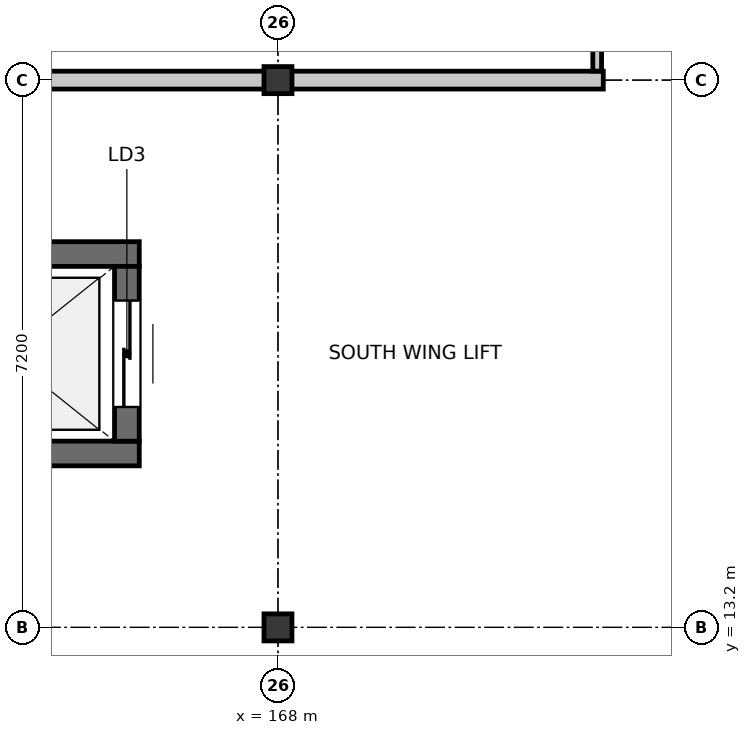
"""IFC4 building model, lengths in metres.
Left out: names, types, materials, properties, quantities, classifications, styles, units other than length and angle.
Written with IfcOpenShell. Run it as: python <this file> out.ifc"""

import sys

from ifc_helpers import new_model, si_unit, direction, frame, frame_2d, origin, origin_2d, place, context, subcontext, project, spatial, rectangle, i_section, extrude, element, fill, save


model = new_model("IFC4")
c1 = context("Model", 3, precision=1e-05, world=origin(), true_north=direction((0.0, 1.0)))
c2 = subcontext(c1, "Body", "Model", "MODEL_VIEW")
j1 = project(units=[si_unit("LENGTHUNIT", "METRE"), si_unit("PLANEANGLEUNIT", "RADIAN")], contexts=[c1])
p1 = place(None, origin())
s1 = spatial("IfcSite", under=j1, at=p1, CompositionType="ELEMENT")
p2 = place(p1, origin())
s2 = spatial("IfcBuilding", under=s1, at=p2, CompositionType="ELEMENT")
p3 = place(p2, frame((0.0, 0.0, 9.3)))
s3 = spatial("IfcBuildingStorey", under=s2, at=p3, CompositionType="ELEMENT", Elevation=9.3)
for number, where, z_axis, x_axis in (
    (1, (168.0, 13.2, 0.0), (0.0, 0.0, 1.0), (1.0, 0.0, 0.0)),
    (2, (168.0, 20.4, 0.0), (0.0, 0.0, 1.0), (1.0, 0.0, 0.0)),
):
    element("IfcColumn", number, at=place(p3, frame(where, z_axis=z_axis, x_axis=x_axis)), inside=s3, PredefinedType="COLUMN", context=c2, shape_type="SweptSolid", body=[
        extrude(i_section(OverallWidth=0.368, OverallDepth=0.356, WebThickness=0.011, FlangeThickness=0.018, FilletRadius=0.015, at=origin_2d()), origin(), (0.0, 0.0, 1.0), 3.9),
    ])
for number, where, z_axis, x_axis in (
    (3, (166.175, 15.488, 0.0), (0.0, 0.0, 1.0), (-1.0, 0.0, 0.0)),
    (4, (162.625, 18.112, 0.0), (0.0, 0.0, 1.0), (1.0, 0.0, 0.0)),
):
    element("IfcWall", number, at=place(p3, frame(where, z_axis=z_axis, x_axis=x_axis)), inside=s3, PredefinedType="SHEAR", context=c2, shape_type="SweptSolid", body=[
        extrude(rectangle(XDim=3.55, YDim=0.325, at=frame_2d((1.775, 0.0))), origin(), (0.0, 0.0, 1.0), 3.6),
    ])
p4 = place(p3, frame((166.012, 17.95, 0.0), z_axis=(0.0, 0.0, 1.0), x_axis=(0.0, -1.0, 0.0)))
e5 = element("IfcWall", 5, at=p4, inside=s3, PredefinedType="SHEAR", context=c2, shape_type="SweptSolid", body=[
    extrude(rectangle(XDim=2.3, YDim=0.325, at=frame_2d((1.15, 0.0))), origin(), (0.0, 0.0, 1.0), 3.6),
])
p5 = place(p4, frame((0.45, 0.0, 0.0)))
e6 = element("IfcOpeningElement", 6, at=p5, cuts=e5, PredefinedType="OPENING", context=c2, shape_type="SweptSolid", body=[
    extrude(rectangle(XDim=1.4, YDim=2.3, at=frame_2d((0.7, 1.15))), frame((0.0, 0.172, 0.0), z_axis=(0.0, -1.0, 0.0), x_axis=(1.0, 0.0, 0.0)), (0.0, 0.0, 1.0), 0.345),
])
p6 = place(p3, frame((172.28, 20.4, 0.0), z_axis=(0.0, 0.0, 1.0), x_axis=(-1.0, 0.0, 0.0)))
e7 = element("IfcWall", 7, at=p6, inside=s3, PredefinedType="PARTITIONING", context=c2, shape_type="SweptSolid", body=[
    extrude(rectangle(XDim=18.548, YDim=0.235, at=frame_2d((9.274, 0.0))), origin(), (0.0, 0.0, 1.0), 2.823),
])
p7 = place(p3, frame((172.2, 59.873, 0.0), z_axis=(0.0, 0.0, 1.0), x_axis=(0.0, -1.0, 0.0)))
e8 = element("IfcWall", 8, at=p7, inside=s3, PredefinedType="PARTITIONING", context=c2, shape_type="SweptSolid", body=[
    extrude(rectangle(XDim=39.354, YDim=0.115, at=frame_2d((19.677, 0.0))), origin(), (0.0, 0.0, 1.0), 2.823),
])
p8 = place(p7, frame((19.227, 0.0, 0.0)))
e9 = element("IfcOpeningElement", 9, at=p8, cuts=e8, PredefinedType="OPENING", context=c2, shape_type="SweptSolid", body=[
    extrude(rectangle(XDim=0.9, YDim=2.1, at=frame_2d((0.45, 1.05))), frame((0.0, 0.067, 0.0), z_axis=(0.0, -1.0, 0.0), x_axis=(1.0, 0.0, 0.0)), (0.0, 0.0, 1.0), 0.135),
])
p9 = place(p7, frame((21.377, 0.0, 0.95)))
e10 = element("IfcOpeningElement", 10, at=p9, cuts=e8, PredefinedType="OPENING", context=c2, shape_type="SweptSolid", body=[
    extrude(rectangle(XDim=1.4, YDim=1.0, at=frame_2d((0.7, 0.5))), frame((0.0, 0.067, 0.0), z_axis=(0.0, -1.0, 0.0), x_axis=(1.0, 0.0, 0.0)), (0.0, 0.0, 1.0), 0.135),
])
p10 = place(p5, origin())
e11 = element("IfcDoor", 11, at=p10, inside=s3, OperationType="DOUBLE_DOOR_SLIDING", PredefinedType="DOOR", context=c2, shape_type="SweptSolid", body=[
    extrude(rectangle(XDim=1.4, YDim=2.3, at=frame_2d((0.7, 1.15))), frame((0.0, 0.025, 0.0), z_axis=(0.0, -1.0, 0.0), x_axis=(1.0, 0.0, 0.0)), (0.0, 0.0, 1.0), 0.05),
])
fill(e6, e11)
save(model, sys.argv[1])
